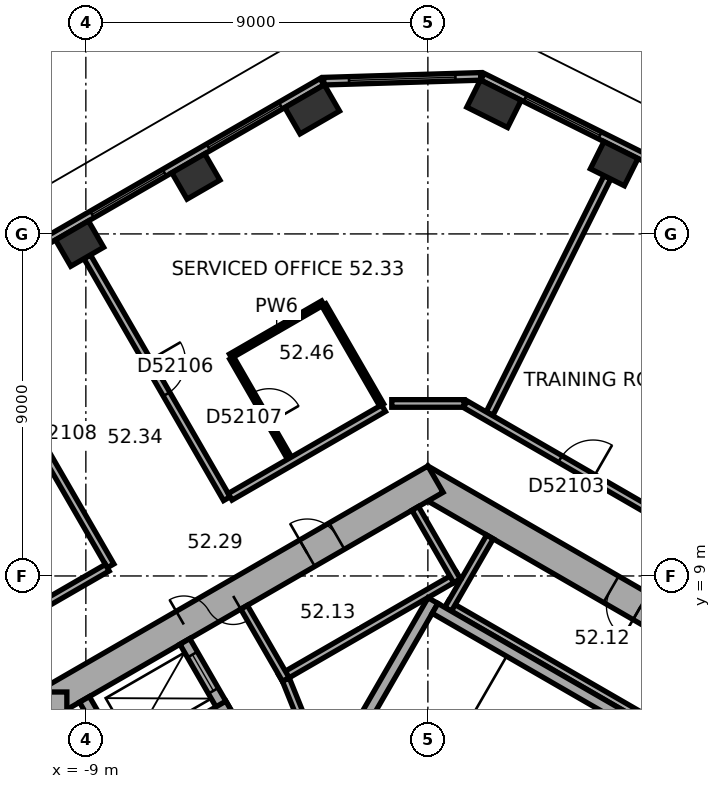
"""IFC4 building model, lengths in metres.
Left out: names, types, materials, properties, quantities, classifications, styles, units other than length and angle.
Written with IfcOpenShell. Run it as: python <this file> out.ifc"""

import sys

from ifc_helpers import new_model, si_unit, direction, frame, frame_2d, origin, origin_2d, place, context, subcontext, project, spatial, rectangle, extrude, element, fill, save


model = new_model("IFC4")
c1 = context("Model", 3, precision=1e-05, world=origin(), true_north=direction((0.0, 1.0)))
c2 = subcontext(c1, "Body", "Model", "MODEL_VIEW")
j1 = project(units=[si_unit("LENGTHUNIT", "METRE"), si_unit("PLANEANGLEUNIT", "RADIAN")], contexts=[c1])
p1 = place(None, origin())
s1 = spatial("IfcSite", under=j1, at=p1, CompositionType="ELEMENT")
p2 = place(p1, origin())
s2 = spatial("IfcBuilding", under=s1, at=p2, CompositionType="ELEMENT")
p3 = place(p2, frame((0.0, 0.0, 210.6)))
s3 = spatial("IfcBuildingStorey", under=s2, at=p3, CompositionType="ELEMENT", Elevation=210.6)
p4 = place(p3, frame((4.902, 19.848, 0.0), z_axis=(0.0, 0.0, 1.0), x_axis=(-0.894934361602, 0.44619781311, 0.0)))
e1 = element("IfcColumn", 1, at=p4, inside=s3, PredefinedType="COLUMN", context=c2, shape_type="SweptSolid", body=[
    extrude(rectangle(XDim=1.0, YDim=0.8, at=origin_2d()), origin(), (0.0, 0.0, 1.0), 3.7),
])
for number, where, z_axis, x_axis in (
    (2, (1.74, 21.425, 0.0), (0.0, 0.0, 1.0), (-0.895, 0.446, 0.0)),
    (3, (-3.044, 21.279, 0.0), (0.0, 0.0, 1.0), (-0.866, -0.5, 0.0)),
):
    element("IfcColumn", number, at=place(p3, frame(where, z_axis=z_axis, x_axis=x_axis)), inside=s3, PredefinedType="COLUMN", context=c2, shape_type="SweptSolid", body=[
        extrude(rectangle(XDim=1.2, YDim=0.8, at=origin_2d()), origin(), (0.0, 0.0, 1.0), 3.7),
    ])
for number, where, z_axis, x_axis in (
    (4, (-6.104, 19.512, 0.0), (0.0, 0.0, 1.0), (-0.866, -0.5, 0.0)),
    (5, (-9.165, 17.745, 0.0), (0.0, 0.0, 1.0), (-0.866, -0.5, 0.0)),
):
    element("IfcColumn", number, at=place(p3, frame(where, z_axis=z_axis, x_axis=x_axis)), inside=s3, PredefinedType="COLUMN", context=c2, shape_type="SweptSolid", body=[
        extrude(rectangle(XDim=1.0, YDim=0.8, at=origin_2d()), origin(), (0.0, 0.0, 1.0), 3.7),
    ])
p5 = place(p3, frame((10.1, 5.6, 0.0), z_axis=(0.0, 0.0, 1.0), x_axis=(-0.866023897231, 0.500002609418, 0.0)))
e6 = element("IfcWall", 6, at=p5, inside=s3, PredefinedType="SHEAR", context=c2, shape_type="SweptSolid", body=[
    extrude(rectangle(XDim=11.894, YDim=0.8, at=frame_2d((5.947, 0.0))), origin(), (0.0, 0.0, 1.0), 3.7),
])
p6 = place(p5, frame((5.197, 0.0, 0.0)))
e7 = element("IfcOpeningElement", 7, at=p6, cuts=e6, PredefinedType="OPENING", context=c2, shape_type="SweptSolid", body=[
    extrude(rectangle(XDim=0.9, YDim=2.1, at=frame_2d((0.45, 1.05))), frame((0.0, 0.41, 0.0), z_axis=(0.0, -1.0, 0.0), x_axis=(1.0, 0.0, 0.0)), (0.0, 0.0, 1.0), 0.82),
])
p7 = place(p3, frame((0.2, 11.547, 0.0), z_axis=(0.0, 0.0, 1.0), x_axis=(-0.866023897231, -0.500002609418, 0.0)))
e8 = element("IfcWall", 8, at=p7, inside=s3, PredefinedType="SHEAR", context=c2, shape_type="SweptSolid", body=[
    extrude(rectangle(XDim=11.894, YDim=0.8, at=frame_2d((5.947, 0.0))), origin(), (0.0, 0.0, 1.0), 3.7),
])
p8 = place(p7, frame((6.147, 0.0, 0.0)))
e9 = element("IfcOpeningElement", 9, at=p8, cuts=e8, PredefinedType="OPENING", context=c2, shape_type="SweptSolid", body=[
    extrude(rectangle(XDim=1.5, YDim=2.1, at=frame_2d((0.75, 1.05))), frame((0.0, 0.41, 0.0), z_axis=(0.0, -1.0, 0.0), x_axis=(1.0, 0.0, 0.0)), (0.0, 0.0, 1.0), 0.82),
])
p9 = place(p7, frame((2.997, 0.0, 0.0)))
e10 = element("IfcOpeningElement", 10, at=p9, cuts=e8, PredefinedType="OPENING", context=c2, shape_type="SweptSolid", body=[
    extrude(rectangle(XDim=0.9, YDim=2.1, at=frame_2d((0.45, 1.05))), frame((0.0, 0.41, 0.0), z_axis=(0.0, -1.0, 0.0), x_axis=(1.0, 0.0, 0.0)), (0.0, 0.0, 1.0), 0.82),
])
p10 = place(p3, frame((-9.9, 5.947, 0.0), z_axis=(0.0, 0.0, 1.0), x_axis=(0.0, -1.0, 0.0)))
e11 = element("IfcWall", 11, at=p10, inside=s3, PredefinedType="SHEAR", context=c2, shape_type="SweptSolid", body=[
    extrude(rectangle(XDim=11.894, YDim=0.8, at=frame_2d((5.947, 0.0))), origin(), (0.0, 0.0, 1.0), 3.7),
])
p11 = place(p10, frame((5.097, 0.0, 0.0)))
e12 = element("IfcOpeningElement", 12, at=p11, cuts=e11, PredefinedType="OPENING", context=c2, shape_type="SweptSolid", body=[
    extrude(rectangle(XDim=1.1, YDim=2.1, at=frame_2d((0.55, 1.05))), frame((0.0, 0.41, 0.0), z_axis=(0.0, -1.0, 0.0), x_axis=(1.0, 0.0, 0.0)), (0.0, 0.0, 1.0), 0.82),
])
p12 = place(p10, frame((7.697, 0.0, 0.0)))
e13 = element("IfcOpeningElement", 13, at=p12, cuts=e11, PredefinedType="OPENING", context=c2, shape_type="SweptSolid", body=[
    extrude(rectangle(XDim=1.1, YDim=2.1, at=frame_2d((0.55, 1.05))), frame((0.0, 0.41, 0.0), z_axis=(0.0, -1.0, 0.0), x_axis=(1.0, 0.0, 0.0)), (0.0, 0.0, 1.0), 0.82),
])
p13 = place(p3, frame((18.299, 13.727, 0.0), z_axis=(0.0, 0.0, 1.0), x_axis=(-0.894934554817, 0.44619742558, 0.0)))
e14 = element("IfcWall", 14, at=p13, inside=s3, PredefinedType="STANDARD", context=c2, shape_type="SweptSolid", body=[
    extrude(rectangle(XDim=18.841, YDim=0.2, at=frame_2d((9.421, 0.0))), origin(), (0.0, 0.0, 1.0), 3.7),
])
p14 = place(p13, frame((1.253, 0.0, 0.9)))
e15 = element("IfcOpeningElement", 15, at=p14, cuts=e14, PredefinedType="OPENING", context=c2, shape_type="SweptSolid", body=[
    extrude(rectangle(XDim=2.2, YDim=2.0, at=frame_2d((1.1, 1.0))), frame((0.0, 0.11, 0.0), z_axis=(0.0, -1.0, 0.0), x_axis=(1.0, 0.0, 0.0)), (0.0, 0.0, 1.0), 0.22),
])
p15 = place(p13, frame((4.786, 0.0, 0.9)))
e16 = element("IfcOpeningElement", 16, at=p15, cuts=e14, PredefinedType="OPENING", context=c2, shape_type="SweptSolid", body=[
    extrude(rectangle(XDim=2.2, YDim=2.0, at=frame_2d((1.1, 1.0))), frame((0.0, 0.11, 0.0), z_axis=(0.0, -1.0, 0.0), x_axis=(1.0, 0.0, 0.0)), (0.0, 0.0, 1.0), 0.22),
])
p16 = place(p13, frame((8.32, 0.0, 0.9)))
e17 = element("IfcOpeningElement", 17, at=p16, cuts=e14, PredefinedType="OPENING", context=c2, shape_type="SweptSolid", body=[
    extrude(rectangle(XDim=2.2, YDim=2.0, at=frame_2d((1.1, 1.0))), frame((0.0, 0.11, 0.0), z_axis=(0.0, -1.0, 0.0), x_axis=(1.0, 0.0, 0.0)), (0.0, 0.0, 1.0), 0.22),
])
p17 = place(p13, frame((11.854, 0.0, 0.9)))
e18 = element("IfcOpeningElement", 18, at=p17, cuts=e14, PredefinedType="OPENING", context=c2, shape_type="SweptSolid", body=[
    extrude(rectangle(XDim=2.2, YDim=2.0, at=frame_2d((1.1, 1.0))), frame((0.0, 0.11, 0.0), z_axis=(0.0, -1.0, 0.0), x_axis=(1.0, 0.0, 0.0)), (0.0, 0.0, 1.0), 0.22),
])
p18 = place(p13, frame((15.387, 0.0, 0.9)))
e19 = element("IfcOpeningElement", 19, at=p18, cuts=e14, PredefinedType="OPENING", context=c2, shape_type="SweptSolid", body=[
    extrude(rectangle(XDim=2.2, YDim=2.0, at=frame_2d((1.1, 1.0))), frame((0.0, 0.11, 0.0), z_axis=(0.0, -1.0, 0.0), x_axis=(1.0, 0.0, 0.0)), (0.0, 0.0, 1.0), 0.22),
])
p19 = place(p3, frame((1.389, 22.145, 0.0), z_axis=(0.0, 0.0, 1.0), x_axis=(-0.999534702881, -0.030502093955, 0.0)))
e20 = element("IfcWall", 20, at=p19, inside=s3, PredefinedType="STANDARD", context=c2, shape_type="SweptSolid", body=[
    extrude(rectangle(XDim=4.13, YDim=0.2, at=frame_2d((2.065, 0.0))), origin(), (0.0, 0.0, 1.0), 3.7),
])
p20 = place(p19, frame((0.665, 0.0, 0.9)))
e21 = element("IfcOpeningElement", 21, at=p20, cuts=e20, PredefinedType="OPENING", context=c2, shape_type="SweptSolid", body=[
    extrude(rectangle(XDim=2.8, YDim=2.0, at=frame_2d((1.4, 1.0))), frame((0.0, 0.11, 0.0), z_axis=(0.0, -1.0, 0.0), x_axis=(1.0, 0.0, 0.0)), (0.0, 0.0, 1.0), 0.22),
])
p21 = place(p3, frame((-2.786, 22.005, 0.0), z_axis=(0.0, 0.0, 1.0), x_axis=(-0.866026555358, -0.49999800541, 0.0)))
e22 = element("IfcWall", 22, at=p21, inside=s3, PredefinedType="STANDARD", context=c2, shape_type="SweptSolid", body=[
    extrude(rectangle(XDim=18.841, YDim=0.2, at=frame_2d((9.421, 0.0))), origin(), (0.0, 0.0, 1.0), 3.7),
])
p22 = place(p21, frame((1.254, 0.0, 0.9)))
e23 = element("IfcOpeningElement", 23, at=p22, cuts=e22, PredefinedType="OPENING", context=c2, shape_type="SweptSolid", body=[
    extrude(rectangle(XDim=2.2, YDim=2.0, at=frame_2d((1.1, 1.0))), frame((0.0, 0.11, 0.0), z_axis=(0.0, -1.0, 0.0), x_axis=(1.0, 0.0, 0.0)), (0.0, 0.0, 1.0), 0.22),
])
p23 = place(p21, frame((4.788, 0.0, 0.9)))
e24 = element("IfcOpeningElement", 24, at=p23, cuts=e22, PredefinedType="OPENING", context=c2, shape_type="SweptSolid", body=[
    extrude(rectangle(XDim=2.2, YDim=2.0, at=frame_2d((1.1, 1.0))), frame((0.0, 0.11, 0.0), z_axis=(0.0, -1.0, 0.0), x_axis=(1.0, 0.0, 0.0)), (0.0, 0.0, 1.0), 0.22),
])
p24 = place(p21, frame((8.321, 0.0, 0.9)))
e25 = element("IfcOpeningElement", 25, at=p24, cuts=e22, PredefinedType="OPENING", context=c2, shape_type="SweptSolid", body=[
    extrude(rectangle(XDim=2.2, YDim=2.0, at=frame_2d((1.1, 1.0))), frame((0.0, 0.11, 0.0), z_axis=(0.0, -1.0, 0.0), x_axis=(1.0, 0.0, 0.0)), (0.0, 0.0, 1.0), 0.22),
])
p25 = place(p21, frame((11.855, 0.0, 0.9)))
e26 = element("IfcOpeningElement", 26, at=p25, cuts=e22, PredefinedType="OPENING", context=c2, shape_type="SweptSolid", body=[
    extrude(rectangle(XDim=2.2, YDim=2.0, at=frame_2d((1.1, 1.0))), frame((0.0, 0.11, 0.0), z_axis=(0.0, -1.0, 0.0), x_axis=(1.0, 0.0, 0.0)), (0.0, 0.0, 1.0), 0.22),
])
p26 = place(p21, frame((15.389, 0.0, 0.9)))
e27 = element("IfcOpeningElement", 27, at=p26, cuts=e22, PredefinedType="OPENING", context=c2, shape_type="SweptSolid", body=[
    extrude(rectangle(XDim=2.2, YDim=2.0, at=frame_2d((1.1, 1.0))), frame((0.0, 0.11, 0.0), z_axis=(0.0, -1.0, 0.0), x_axis=(1.0, 0.0, 0.0)), (0.0, 0.0, 1.0), 0.22),
])
p27 = place(p3, frame((7.424, 4.259, 0.0), z_axis=(0.0, 0.0, 1.0), x_axis=(-0.866026010844, 0.49999894854, 0.0)))
e28 = element("IfcWall", 28, at=p27, inside=s3, PredefinedType="PARTITIONING", context=c2, shape_type="SweptSolid", body=[
    extrude(rectangle(XDim=8.0, YDim=0.2, at=frame_2d((4.0, 0.0))), origin(), (0.0, 0.0, 1.0), 3.35),
])
p28 = place(p3, frame((0.532, 8.122, 0.0), z_axis=(0.0, 0.0, 1.0), x_axis=(0.500077893725, 0.86598042715, 0.0)))
e29 = element("IfcWall", 29, at=p28, inside=s3, PredefinedType="PARTITIONING", context=c2, shape_type="SweptSolid", body=[
    extrude(rectangle(XDim=2.2, YDim=0.2, at=frame_2d((1.1, 0.0))), origin(), (0.0, 0.0, 1.0), 3.35),
])
p29 = place(p3, frame((0.803, 9.009, 0.0), z_axis=(0.0, 0.0, 1.0), x_axis=(-0.866028230842, -0.499995103361, 0.0)))
e30 = element("IfcWall", 30, at=p29, inside=s3, PredefinedType="PARTITIONING", context=c2, shape_type="SweptSolid", body=[
    extrude(rectangle(XDim=5.4, YDim=0.2, at=frame_2d((2.7, 0.0))), origin(), (0.0, 0.0, 1.0), 3.35),
])
p30 = place(p3, frame((0.767, 8.872, 0.0), z_axis=(0.0, 0.0, 1.0), x_axis=(-0.499994660107, 0.866028486751, 0.0)))
e31 = element("IfcWall", 31, at=p30, inside=s3, PredefinedType="PARTITIONING", context=c2, shape_type="SweptSolid", body=[
    extrude(rectangle(XDim=2.2, YDim=0.2, at=frame_2d((1.1, 0.0))), origin(), (0.0, 0.0, 1.0), 3.35),
])
p31 = place(p3, frame((-3.737, 6.272, 0.0), z_axis=(0.0, 0.0, 1.0), x_axis=(-0.50002983664, 0.866008176907, 0.0)))
e32 = element("IfcWall", 32, at=p31, inside=s3, PredefinedType="PARTITIONING", context=c2, shape_type="SweptSolid", body=[
    extrude(rectangle(XDim=2.2, YDim=0.2, at=frame_2d((1.1, 0.0))), origin(), (0.0, 0.0, 1.0), 3.35),
])
p32 = place(p3, frame((-2.216, 4.282, 0.0), z_axis=(0.0, 0.0, 1.0), x_axis=(0.499977259774, 0.866038532462, 0.0)))
e33 = element("IfcWall", 33, at=p32, inside=s3, PredefinedType="SHEAR", context=c2, shape_type="SweptSolid", body=[
    extrude(rectangle(XDim=4.7, YDim=0.3, at=frame_2d((2.35, 0.0))), origin(), (0.0, 0.0, 1.0), 3.35),
])
p33 = place(p3, frame((6.303, 4.617, 0.0), z_axis=(0.0, 0.0, 1.0), x_axis=(-0.866027801685, 0.499995846692, 0.0)))
e34 = element("IfcWall", 34, at=p33, inside=s3, PredefinedType="SHEAR", context=c2, shape_type="SweptSolid", body=[
    extrude(rectangle(XDim=7.06, YDim=0.3, at=frame_2d((3.53, 0.0))), origin(), (0.0, 0.0, 1.0), 3.35),
])
p34 = place(p3, frame((-5.295, 5.372, 0.0), z_axis=(0.0, 0.0, 1.0), x_axis=(-0.500077893725, 0.86598042715, 0.0)))
e35 = element("IfcWall", 35, at=p34, inside=s3, PredefinedType="SHEAR", context=c2, shape_type="SweptSolid", body=[
    extrude(rectangle(XDim=2.2, YDim=0.3, at=frame_2d((1.1, 0.0))), origin(), (0.0, 0.0, 1.0), 3.35),
])
p35 = place(p34, frame((0.7, 0.0, 0.0)))
e36 = element("IfcOpeningElement", 36, at=p35, cuts=e35, PredefinedType="OPENING", context=c2, shape_type="SweptSolid", body=[
    extrude(rectangle(XDim=1.1, YDim=2.1, at=frame_2d((0.55, 1.05))), frame((0.0, 0.16, 0.0), z_axis=(0.0, -1.0, 0.0), x_axis=(1.0, 0.0, 0.0)), (0.0, 0.0, 1.0), 0.32),
])
p36 = place(p3, frame((-5.24, 5.577, 0.0), z_axis=(0.0, 0.0, 1.0), x_axis=(-0.866014461049, -0.500018952895, 0.0)))
e37 = element("IfcWall", 37, at=p36, inside=s3, PredefinedType="SHEAR", context=c2, shape_type="SweptSolid", body=[
    extrude(rectangle(XDim=3.35, YDim=0.3, at=frame_2d((1.675, 0.0))), origin(), (0.0, 0.0, 1.0), 3.35),
])
p37 = place(p3, frame((-7.937, 3.847, 0.0), z_axis=(0.0, 0.0, 1.0), x_axis=(-0.50002983664, 0.866008176907, 0.0)))
e38 = element("IfcWall", 38, at=p37, inside=s3, PredefinedType="SHEAR", context=c2, shape_type="SweptSolid", body=[
    extrude(rectangle(XDim=2.2, YDim=0.3, at=frame_2d((1.1, 0.0))), origin(), (0.0, 0.0, 1.0), 3.35),
])
p38 = place(p3, frame((-2.615, 3.487, 0.0), z_axis=(0.0, 0.0, 1.0), x_axis=(-0.373576831041, 0.92759924068, 0.0)))
e39 = element("IfcWall", 39, at=p38, inside=s3, PredefinedType="PARTITIONING", context=c2, shape_type="SweptSolid", body=[
    extrude(rectangle(XDim=3.002, YDim=0.2, at=frame_2d((1.501, 0.0))), origin(), (0.0, 0.0, 1.0), 3.35),
])
p39 = place(p38, frame((1.15, 0.0, 0.0)))
e40 = element("IfcOpeningElement", 40, at=p39, cuts=e39, PredefinedType="OPENING", context=c2, shape_type="SweptSolid", body=[
    extrude(rectangle(XDim=0.9, YDim=2.1, at=frame_2d((0.45, 1.05))), frame((0.0, 0.11, 0.0), z_axis=(0.0, -1.0, 0.0), x_axis=(1.0, 0.0, 0.0)), (0.0, 0.0, 1.0), 0.22),
])
p40 = place(p3, frame((-12.025, 15.632, 0.0), z_axis=(0.0, 0.0, 1.0), x_axis=(0.499983153418, -0.866035129944, 0.0)))
e41 = element("IfcWall", 41, at=p40, inside=s3, PredefinedType="PARTITIONING", context=c2, shape_type="SweptSolid", body=[
    extrude(rectangle(XDim=7.35, YDim=0.2, at=frame_2d((3.675, 0.0))), origin(), (0.0, 0.0, 1.0), 3.35),
])
p41 = place(p40, frame((3.175, 0.0, 0.0)))
e42 = element("IfcOpeningElement", 42, at=p41, cuts=e41, PredefinedType="OPENING", context=c2, shape_type="SweptSolid", body=[
    extrude(rectangle(XDim=1.0, YDim=2.1, at=frame_2d((0.5, 1.05))), frame((0.0, 0.11, 0.0), z_axis=(0.0, -1.0, 0.0), x_axis=(1.0, 0.0, 0.0)), (0.0, 0.0, 1.0), 0.22),
])
p42 = place(p3, frame((-8.965, 17.399, 0.0), z_axis=(0.0, 0.0, 1.0), x_axis=(0.499993683172, -0.866029050776, 0.0)))
e43 = element("IfcWall", 43, at=p42, inside=s3, PredefinedType="PARTITIONING", context=c2, shape_type="SweptSolid", body=[
    extrude(rectangle(XDim=7.35, YDim=0.2, at=frame_2d((3.675, 0.0))), origin(), (0.0, 0.0, 1.0), 2.65),
])
p43 = place(p42, frame((3.175, 0.0, 0.0)))
e44 = element("IfcOpeningElement", 44, at=p43, cuts=e43, PredefinedType="OPENING", context=c2, shape_type="SweptSolid", body=[
    extrude(rectangle(XDim=1.0, YDim=2.1, at=frame_2d((0.5, 1.05))), frame((0.0, 0.11, 0.0), z_axis=(0.0, -1.0, 0.0), x_axis=(1.0, 0.0, 0.0)), (0.0, 0.0, 1.0), 0.22),
])
p44 = place(p3, frame((-8.437, 9.217, 0.0), z_axis=(0.0, 0.0, 1.0), x_axis=(-0.866005660673, -0.500034194513, 0.0)))
e45 = element("IfcWall", 45, at=p44, inside=s3, PredefinedType="PARTITIONING", context=c2, shape_type="SweptSolid", body=[
    extrude(rectangle(XDim=3.209, YDim=0.2, at=frame_2d((1.604, 0.0))), origin(), (0.0, 0.0, 1.0), 3.35),
])
p45 = place(p3, frame((-5.191, 14.785, 0.0), z_axis=(0.0, 0.0, 1.0), x_axis=(0.866034573852, 0.49998411664, 0.0)))
e46 = element("IfcWall", 46, at=p45, inside=s3, PredefinedType="PARTITIONING", context=c2, shape_type="SweptSolid", body=[
    extrude(rectangle(XDim=2.8, YDim=0.12, at=frame_2d((1.4, 0.0))), origin(), (0.0, 0.0, 1.0), 3.35),
])
p46 = place(p3, frame((-3.641, 12.101, 0.0), z_axis=(0.0, 0.0, 1.0), x_axis=(-0.500026023896, 0.86601037836, 0.0)))
e47 = element("IfcWall", 47, at=p46, inside=s3, PredefinedType="PARTITIONING", context=c2, shape_type="SweptSolid", body=[
    extrude(rectangle(XDim=3.04, YDim=0.12, at=frame_2d((1.52, 0.0))), origin(), (0.0, 0.0, 1.0), 3.35),
])
p47 = place(p46, frame((1.07, 0.0, 0.0)))
e48 = element("IfcOpeningElement", 48, at=p47, cuts=e47, PredefinedType="OPENING", context=c2, shape_type="SweptSolid", body=[
    extrude(rectangle(XDim=0.9, YDim=2.1, at=frame_2d((0.45, 1.05))), frame((0.0, 0.07, 0.0), z_axis=(0.0, -1.0, 0.0), x_axis=(1.0, 0.0, 0.0)), (0.0, 0.0, 1.0), 0.14),
])
p48 = place(p3, frame((-2.737, 16.133, 0.0), z_axis=(0.0, 0.0, 1.0), x_axis=(0.500026023896, -0.86601037836, 0.0)))
e49 = element("IfcWall", 49, at=p48, inside=s3, PredefinedType="PARTITIONING", context=c2, shape_type="SweptSolid", body=[
    extrude(rectangle(XDim=3.04, YDim=0.12, at=frame_2d((1.52, 0.0))), origin(), (0.0, 0.0, 1.0), 3.35),
])
p49 = place(p3, frame((-1.167, 13.414, 0.0), z_axis=(0.0, 0.0, 1.0), x_axis=(-0.866023347809, -0.500003561037, 0.0)))
e50 = element("IfcWall", 50, at=p49, inside=s3, PredefinedType="PARTITIONING", context=c2, shape_type="SweptSolid", body=[
    extrude(rectangle(XDim=4.661, YDim=0.2, at=frame_2d((2.331, 0.0))), origin(), (0.0, 0.0, 1.0), 3.35),
])
p50 = place(p3, frame((0.95, 13.539, 0.0), z_axis=(0.0, 0.0, 1.0), x_axis=(-1.0, 0.0, 0.0)))
e51 = element("IfcWall", 51, at=p50, inside=s3, PredefinedType="PARTITIONING", context=c2, shape_type="SweptSolid", body=[
    extrude(rectangle(XDim=1.9, YDim=0.2, at=frame_2d((0.95, 0.0))), origin(), (0.0, 0.0, 1.0), 3.35),
])
p51 = place(p3, frame((4.723, 19.49, 0.0), z_axis=(0.0, 0.0, 1.0), x_axis=(-0.446186614574, -0.894939944898, 0.0)))
e52 = element("IfcWall", 52, at=p51, inside=s3, PredefinedType="PARTITIONING", context=c2, shape_type="SweptSolid", body=[
    extrude(rectangle(XDim=6.944, YDim=0.2, at=frame_2d((3.472, 0.0))), origin(), (0.0, 0.0, 1.0), 2.65),
])
p52 = place(p3, frame((8.721, 9.052, 0.0), z_axis=(0.0, 0.0, 1.0), x_axis=(-0.866028125821, 0.499995285264, 0.0)))
e53 = element("IfcWall", 53, at=p52, inside=s3, PredefinedType="PARTITIONING", context=c2, shape_type="SweptSolid", body=[
    extrude(rectangle(XDim=8.934, YDim=0.2, at=frame_2d((4.467, 0.0))), origin(), (0.0, 0.0, 1.0), 3.35),
])
p53 = place(p52, frame((5.05, 0.0, 0.0)))
e54 = element("IfcOpeningElement", 54, at=p53, cuts=e53, PredefinedType="OPENING", context=c2, shape_type="SweptSolid", body=[
    extrude(rectangle(XDim=1.0, YDim=2.1, at=frame_2d((0.5, 1.05))), frame((0.0, 0.11, 0.0), z_axis=(0.0, -1.0, 0.0), x_axis=(1.0, 0.0, 0.0)), (0.0, 0.0, 1.0), 0.22),
])
p54 = place(p18, origin())
e55 = element("IfcWindow", 55, at=p54, inside=s3, PartitioningType="SINGLE_PANEL", PredefinedType="WINDOW", context=c2, shape_type="SweptSolid", body=[
    extrude(rectangle(XDim=2.2, YDim=2.0, at=frame_2d((1.1, 1.0))), frame((0.0, 0.03, 0.0), z_axis=(0.0, -1.0, 0.0), x_axis=(1.0, 0.0, 0.0)), (0.0, 0.0, 1.0), 0.06),
])
fill(e19, e55)
p55 = place(p20, origin())
e56 = element("IfcWindow", 56, at=p55, inside=s3, PartitioningType="SINGLE_PANEL", PredefinedType="WINDOW", context=c2, shape_type="SweptSolid", body=[
    extrude(rectangle(XDim=2.8, YDim=2.0, at=frame_2d((1.4, 1.0))), frame((0.0, 0.03, 0.0), z_axis=(0.0, -1.0, 0.0), x_axis=(1.0, 0.0, 0.0)), (0.0, 0.0, 1.0), 0.06),
])
fill(e21, e56)
p56 = place(p22, origin())
e57 = element("IfcWindow", 57, at=p56, inside=s3, PartitioningType="SINGLE_PANEL", PredefinedType="WINDOW", context=c2, shape_type="SweptSolid", body=[
    extrude(rectangle(XDim=2.2, YDim=2.0, at=frame_2d((1.1, 1.0))), frame((0.0, 0.03, 0.0), z_axis=(0.0, -1.0, 0.0), x_axis=(1.0, 0.0, 0.0)), (0.0, 0.0, 1.0), 0.06),
])
fill(e23, e57)
p57 = place(p23, origin())
e58 = element("IfcWindow", 58, at=p57, inside=s3, PartitioningType="SINGLE_PANEL", PredefinedType="WINDOW", context=c2, shape_type="SweptSolid", body=[
    extrude(rectangle(XDim=2.2, YDim=2.0, at=frame_2d((1.1, 1.0))), frame((0.0, 0.03, 0.0), z_axis=(0.0, -1.0, 0.0), x_axis=(1.0, 0.0, 0.0)), (0.0, 0.0, 1.0), 0.06),
])
fill(e24, e58)
p58 = place(p8, origin())
e59 = element("IfcDoor", 59, at=p58, inside=s3, OperationType="DOUBLE_DOOR_SINGLE_SWING", PredefinedType="DOOR", context=c2, shape_type="SweptSolid", body=[
    extrude(rectangle(XDim=1.5, YDim=2.1, at=frame_2d((0.75, 1.05))), frame((0.0, 0.025, 0.0), z_axis=(0.0, -1.0, 0.0), x_axis=(1.0, 0.0, 0.0)), (0.0, 0.0, 1.0), 0.05),
])
fill(e9, e59)
p59 = place(p6, origin())
e60 = element("IfcDoor", 60, at=p59, inside=s3, OperationType="SINGLE_SWING_LEFT", PredefinedType="DOOR", context=c2, shape_type="SweptSolid", body=[
    extrude(rectangle(XDim=0.9, YDim=2.1, at=frame_2d((0.45, 1.05))), frame((0.0, 0.025, 0.0), z_axis=(0.0, -1.0, 0.0), x_axis=(1.0, 0.0, 0.0)), (0.0, 0.0, 1.0), 0.05),
])
fill(e7, e60)
p60 = place(p9, origin())
e61 = element("IfcDoor", 61, at=p60, inside=s3, OperationType="SINGLE_SWING_LEFT", PredefinedType="DOOR", context=c2, shape_type="SweptSolid", body=[
    extrude(rectangle(XDim=0.9, YDim=2.1, at=frame_2d((0.45, 1.05))), frame((0.0, 0.025, 0.0), z_axis=(0.0, -1.0, 0.0), x_axis=(1.0, 0.0, 0.0)), (0.0, 0.0, 1.0), 0.05),
])
fill(e10, e61)
p61 = place(p35, origin())
e62 = element("IfcDoor", 62, at=p61, inside=s3, OperationType="DOUBLE_DOOR_SLIDING", PredefinedType="DOOR", context=c2, shape_type="SweptSolid", body=[
    extrude(rectangle(XDim=1.1, YDim=2.1, at=frame_2d((0.55, 1.05))), frame((0.0, 0.025, 0.0), z_axis=(0.0, -1.0, 0.0), x_axis=(1.0, 0.0, 0.0)), (0.0, 0.0, 1.0), 0.05),
])
fill(e36, e62)
p62 = place(p53, origin())
e63 = element("IfcDoor", 63, at=p62, inside=s3, OperationType="SINGLE_SWING_LEFT", PredefinedType="DOOR", context=c2, shape_type="SweptSolid", body=[
    extrude(rectangle(XDim=1.0, YDim=2.1, at=frame_2d((0.5, 1.05))), frame((0.0, 0.025, 0.0), z_axis=(0.0, -1.0, 0.0), x_axis=(1.0, 0.0, 0.0)), (0.0, 0.0, 1.0), 0.05),
])
fill(e54, e63)
p63 = place(p43, origin())
e64 = element("IfcDoor", 64, at=p63, inside=s3, OperationType="SINGLE_SWING_LEFT", PredefinedType="DOOR", context=c2, shape_type="SweptSolid", body=[
    extrude(rectangle(XDim=1.0, YDim=2.1, at=frame_2d((0.5, 1.05))), frame((0.0, 0.025, 0.0), z_axis=(0.0, -1.0, 0.0), x_axis=(1.0, 0.0, 0.0)), (0.0, 0.0, 1.0), 0.05),
])
fill(e44, e64)
p64 = place(p47, origin())
e65 = element("IfcDoor", 65, at=p64, inside=s3, OperationType="SINGLE_SWING_LEFT", PredefinedType="DOOR", context=c2, shape_type="SweptSolid", body=[
    extrude(rectangle(XDim=0.9, YDim=2.1, at=frame_2d((0.45, 1.05))), frame((0.0, 0.025, 0.0), z_axis=(0.0, -1.0, 0.0), x_axis=(1.0, 0.0, 0.0)), (0.0, 0.0, 1.0), 0.05),
])
fill(e48, e65)
save(model, sys.argv[1])
